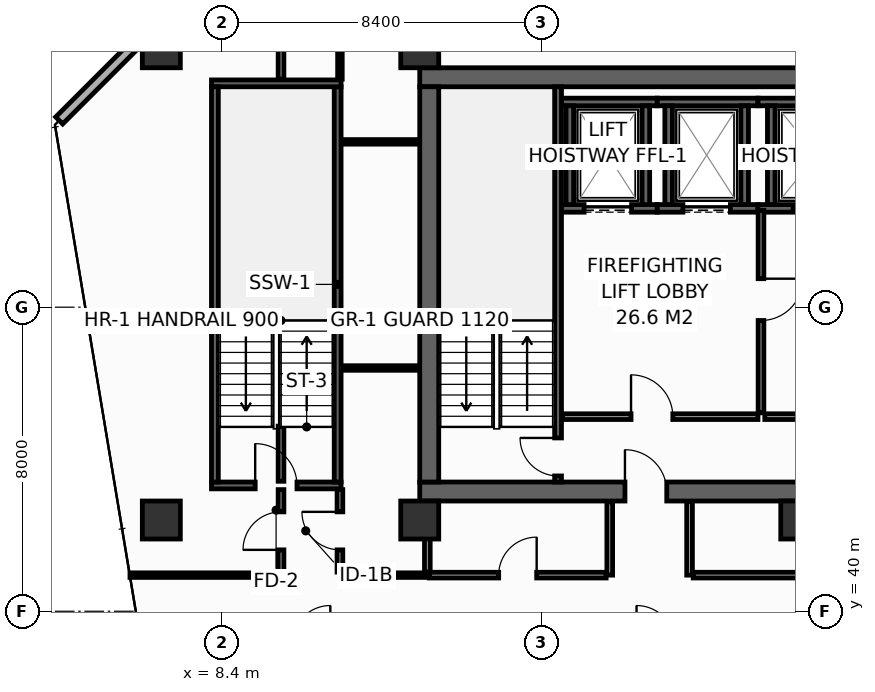
"""IFC4 building model, lengths in metres.
Left out: names, types, materials, properties, quantities, classifications, styles, units other than length and angle.
Written with IfcOpenShell. Run it as: python <this file> out.ifc"""

import sys

from ifc_helpers import new_model, si_unit, direction, frame, frame_2d, origin, origin_2d, place, context, subcontext, project, spatial, rectangle, hollow_rectangle, extrude, element, fill, save


model = new_model("IFC4")
c1 = context("Model", 3, precision=1e-05, world=origin(), true_north=direction((0.0, 1.0)))
c2 = subcontext(c1, "Body", "Model", "MODEL_VIEW")
j1 = project(units=[si_unit("LENGTHUNIT", "METRE"), si_unit("PLANEANGLEUNIT", "RADIAN")], contexts=[c1])
p1 = place(None, origin())
s1 = spatial("IfcSite", under=j1, at=p1, CompositionType="ELEMENT")
p2 = place(p1, origin())
s2 = spatial("IfcBuilding", under=s1, at=p2, CompositionType="ELEMENT")
p3 = place(p2, frame((0.0, 0.0, 148.6)))
s3 = spatial("IfcBuildingStorey", under=s2, at=p3, CompositionType="ELEMENT", Elevation=148.6)
p4 = place(p3, frame((13.6, 43.15, 0.0), z_axis=(0.0, 0.0, 1.0), x_axis=(1.0, 0.0, 0.0)))
e1 = element("IfcWall", 1, at=p4, inside=s3, PredefinedType="SHEAR", context=c2, shape_type="SweptSolid", body=[
    extrude(rectangle(XDim=32.7, YDim=0.5, at=frame_2d((16.35, 0.0))), origin(), (0.0, 0.0, 1.0), 3.55),
])
p5 = place(p4, frame((5.4, 0.0, 0.0)))
e2 = element("IfcOpeningElement", 2, at=p5, cuts=e1, PredefinedType="OPENING", context=c2, shape_type="SweptSolid", body=[
    extrude(rectangle(XDim=1.1, YDim=2.15, at=frame_2d((0.55, 1.075))), frame((0.0, 0.26, 0.0), z_axis=(0.0, -1.0, 0.0), x_axis=(1.0, 0.0, 0.0)), (0.0, 0.0, 1.0), 0.52),
])
p6 = place(p4, frame((25.6, 0.0, 0.0)))
e3 = element("IfcOpeningElement", 3, at=p6, cuts=e1, PredefinedType="OPENING", context=c2, shape_type="SweptSolid", body=[
    extrude(rectangle(XDim=1.1, YDim=2.15, at=frame_2d((0.55, 1.075))), frame((0.0, 0.26, 0.0), z_axis=(0.0, -1.0, 0.0), x_axis=(1.0, 0.0, 0.0)), (0.0, 0.0, 1.0), 0.52),
])
p7 = place(p3, frame((13.6, 54.05, 0.0), z_axis=(0.0, 0.0, 1.0), x_axis=(1.0, 0.0, 0.0)))
e4 = element("IfcWall", 4, at=p7, inside=s3, PredefinedType="SHEAR", context=c2, shape_type="SweptSolid", body=[
    extrude(rectangle(XDim=32.7, YDim=0.5, at=frame_2d((16.35, 0.0))), origin(), (0.0, 0.0, 1.0), 3.55),
])
p8 = place(p3, frame((13.85, 43.4, 0.0), z_axis=(0.0, 0.0, 1.0), x_axis=(0.0, 1.0, 0.0)))
e5 = element("IfcWall", 5, at=p8, inside=s3, PredefinedType="SHEAR", context=c2, shape_type="SweptSolid", body=[
    extrude(rectangle(XDim=10.4, YDim=0.5, at=frame_2d((5.2, 0.0))), origin(), (0.0, 0.0, 1.0), 3.55),
])
for number, where, z_axis, x_axis in (
    (6, (6.8, 54.8, 0.0), (0.0, 0.0, 1.0), (1.0, 0.0, 0.0)),
    (7, (13.6, 54.8, 0.0), (0.0, 0.0, 1.0), (1.0, 0.0, 0.0)),
    (8, (6.8, 42.4, 0.0), (0.0, 0.0, 1.0), (1.0, 0.0, 0.0)),
    (9, (13.6, 42.4, 0.0), (0.0, 0.0, 1.0), (1.0, 0.0, 0.0)),
    (10, (23.6, 42.4, 0.0), (0.0, 0.0, 1.0), (1.0, 0.0, 0.0)),
):
    element("IfcColumn", number, at=place(p3, frame(where, z_axis=z_axis, x_axis=x_axis)), inside=s3, PredefinedType="COLUMN", context=c2, shape_type="SweptSolid", body=[
        extrude(hollow_rectangle(XDim=1.0, YDim=1.0, WallThickness=0.045, at=origin_2d()), origin(), (0.0, 0.0, 1.0), 3.8),
    ])
p9 = place(p3, frame((17.33, 50.6, 0.0), z_axis=(0.0, 0.0, 1.0), x_axis=(1.0, 0.0, 0.0)))
e11 = element("IfcWall", 11, at=p9, inside=s3, PredefinedType="SHEAR", context=c2, shape_type="SweptSolid", body=[
    extrude(rectangle(XDim=2.52, YDim=0.2, at=frame_2d((1.26, 0.0))), origin(), (0.0, 0.0, 1.0), 3.55),
])
p10 = place(p9, frame((0.595, 0.0, 0.0)))
e12 = element("IfcOpeningElement", 12, at=p10, cuts=e11, PredefinedType="OPENING", context=c2, shape_type="SweptSolid", body=[
    extrude(rectangle(XDim=1.25, YDim=2.3, at=frame_2d((0.625, 1.15))), frame((0.0, 0.11, 0.0), z_axis=(0.0, -1.0, 0.0), x_axis=(1.0, 0.0, 0.0)), (0.0, 0.0, 1.0), 0.22),
])
p11 = place(p3, frame((17.33, 53.4, 0.0), z_axis=(0.0, 0.0, 1.0), x_axis=(1.0, 0.0, 0.0)))
e13 = element("IfcWall", 13, at=p11, inside=s3, PredefinedType="SHEAR", context=c2, shape_type="SweptSolid", body=[
    extrude(rectangle(XDim=2.52, YDim=0.2, at=frame_2d((1.26, 0.0))), origin(), (0.0, 0.0, 1.0), 3.55),
])
for number, where, z_axis, x_axis in (
    (14, (17.55, 50.7, 0.0), (0.0, 0.0, 1.0), (0.0, 1.0, 0.0)),
    (15, (19.55, 50.7, 0.0), (0.0, 0.0, 1.0), (0.0, 1.0, 0.0)),
):
    element("IfcWall", number, at=place(p3, frame(where, z_axis=z_axis, x_axis=x_axis)), inside=s3, PredefinedType="SHEAR", context=c2, shape_type="SweptSolid", body=[
        extrude(rectangle(XDim=2.6, YDim=0.2, at=frame_2d((1.3, 0.0))), origin(), (0.0, 0.0, 1.0), 3.55),
    ])
p12 = place(p3, frame((19.85, 50.6, 0.0), z_axis=(0.0, 0.0, 1.0), x_axis=(1.0, 0.0, 0.0)))
e16 = element("IfcWall", 16, at=p12, inside=s3, PredefinedType="SHEAR", context=c2, shape_type="SweptSolid", body=[
    extrude(rectangle(XDim=2.65, YDim=0.2, at=frame_2d((1.325, 0.0))), origin(), (0.0, 0.0, 1.0), 3.55),
])
p13 = place(p12, frame((0.675, 0.0, 0.0)))
e17 = element("IfcOpeningElement", 17, at=p13, cuts=e16, PredefinedType="OPENING", context=c2, shape_type="SweptSolid", body=[
    extrude(rectangle(XDim=1.25, YDim=2.3, at=frame_2d((0.625, 1.15))), frame((0.0, 0.11, 0.0), z_axis=(0.0, -1.0, 0.0), x_axis=(1.0, 0.0, 0.0)), (0.0, 0.0, 1.0), 0.22),
])
p14 = place(p3, frame((19.85, 53.4, 0.0), z_axis=(0.0, 0.0, 1.0), x_axis=(1.0, 0.0, 0.0)))
e18 = element("IfcWall", 18, at=p14, inside=s3, PredefinedType="SHEAR", context=c2, shape_type="SweptSolid", body=[
    extrude(rectangle(XDim=2.65, YDim=0.2, at=frame_2d((1.325, 0.0))), origin(), (0.0, 0.0, 1.0), 3.55),
])
for number, where, z_axis, x_axis in (
    (19, (20.15, 50.7, 0.0), (0.0, 0.0, 1.0), (0.0, 1.0, 0.0)),
    (20, (22.15, 50.7, 0.0), (0.0, 0.0, 1.0), (0.0, 1.0, 0.0)),
):
    element("IfcWall", number, at=place(p3, frame(where, z_axis=z_axis, x_axis=x_axis)), inside=s3, PredefinedType="SHEAR", context=c2, shape_type="SweptSolid", body=[
        extrude(rectangle(XDim=2.6, YDim=0.2, at=frame_2d((1.3, 0.0))), origin(), (0.0, 0.0, 1.0), 3.55),
    ])
p15 = place(p3, frame((22.5, 50.6, 0.0), z_axis=(0.0, 0.0, 1.0), x_axis=(1.0, 0.0, 0.0)))
e21 = element("IfcWall", 21, at=p15, inside=s3, PredefinedType="SHEAR", context=c2, shape_type="SweptSolid", body=[
    extrude(rectangle(XDim=2.85, YDim=0.2, at=frame_2d((1.425, 0.0))), origin(), (0.0, 0.0, 1.0), 3.55),
])
p16 = place(p15, frame((0.925, 0.0, 0.0)))
e22 = element("IfcOpeningElement", 22, at=p16, cuts=e21, PredefinedType="OPENING", context=c2, shape_type="SweptSolid", body=[
    extrude(rectangle(XDim=1.25, YDim=2.3, at=frame_2d((0.625, 1.15))), frame((0.0, 0.11, 0.0), z_axis=(0.0, -1.0, 0.0), x_axis=(1.0, 0.0, 0.0)), (0.0, 0.0, 1.0), 0.22),
])
p17 = place(p3, frame((22.5, 53.4, 0.0), z_axis=(0.0, 0.0, 1.0), x_axis=(1.0, 0.0, 0.0)))
e23 = element("IfcWall", 23, at=p17, inside=s3, PredefinedType="SHEAR", context=c2, shape_type="SweptSolid", body=[
    extrude(rectangle(XDim=2.85, YDim=0.2, at=frame_2d((1.425, 0.0))), origin(), (0.0, 0.0, 1.0), 3.55),
])
p18 = place(p3, frame((22.85, 50.7, 0.0), z_axis=(0.0, 0.0, 1.0), x_axis=(0.0, 1.0, 0.0)))
e24 = element("IfcWall", 24, at=p18, inside=s3, PredefinedType="SHEAR", context=c2, shape_type="SweptSolid", body=[
    extrude(rectangle(XDim=2.6, YDim=0.2, at=frame_2d((1.3, 0.0))), origin(), (0.0, 0.0, 1.0), 3.55),
])
p19 = place(p3, frame((17.24, 43.4, 0.0), z_axis=(0.0, 0.0, 1.0), x_axis=(0.0, 1.0, 0.0)))
e25 = element("IfcWall", 25, at=p19, inside=s3, PredefinedType="SHEAR", context=c2, shape_type="SweptSolid", body=[
    extrude(rectangle(XDim=10.4, YDim=0.18, at=frame_2d((5.2, 0.0))), origin(), (0.0, 0.0, 1.0), 3.55),
])
p20 = place(p19, frame((0.16, 0.0, 0.0)))
e26 = element("IfcOpeningElement", 26, at=p20, cuts=e25, PredefinedType="OPENING", context=c2, shape_type="SweptSolid", body=[
    extrude(rectangle(XDim=1.0, YDim=2.15, at=frame_2d((0.5, 1.075))), frame((0.0, 0.1, 0.0), z_axis=(0.0, -1.0, 0.0), x_axis=(1.0, 0.0, 0.0)), (0.0, 0.0, 1.0), 0.2),
])
p21 = place(p3, frame((8.12, 43.31, 0.0), z_axis=(0.0, 0.0, 1.0), x_axis=(1.0, 0.0, 0.0)))
e27 = element("IfcWall", 27, at=p21, inside=s3, PredefinedType="SHEAR", context=c2, shape_type="SweptSolid", body=[
    extrude(rectangle(XDim=3.41, YDim=0.18, at=frame_2d((1.705, 0.0))), origin(), (0.0, 0.0, 1.0), 3.55),
])
p22 = place(p21, frame((1.15, 0.0, 0.0)))
e28 = element("IfcOpeningElement", 28, at=p22, cuts=e27, PredefinedType="OPENING", context=c2, shape_type="SweptSolid", body=[
    extrude(rectangle(XDim=1.1, YDim=2.15, at=frame_2d((0.55, 1.075))), frame((0.0, 0.1, 0.0), z_axis=(0.0, -1.0, 0.0), x_axis=(1.0, 0.0, 0.0)), (0.0, 0.0, 1.0), 0.2),
])
p23 = place(p3, frame((11.44, 43.4, 0.0), z_axis=(0.0, 0.0, 1.0), x_axis=(0.0, 1.0, 0.0)))
e29 = element("IfcWall", 29, at=p23, inside=s3, PredefinedType="SHEAR", context=c2, shape_type="SweptSolid", body=[
    extrude(rectangle(XDim=10.4, YDim=0.18, at=frame_2d((5.2, 0.0))), origin(), (0.0, 0.0, 1.0), 3.55),
])
p24 = place(p3, frame((11.53, 53.89, 0.0), z_axis=(0.0, 0.0, 1.0), x_axis=(-1.0, 0.0, 0.0)))
e30 = element("IfcWall", 30, at=p24, inside=s3, PredefinedType="SHEAR", context=c2, shape_type="SweptSolid", body=[
    extrude(rectangle(XDim=3.41, YDim=0.18, at=frame_2d((1.705, 0.0))), origin(), (0.0, 0.0, 1.0), 3.55),
])
p25 = place(p3, frame((8.21, 53.8, 0.0), z_axis=(0.0, 0.0, 1.0), x_axis=(0.0, -1.0, 0.0)))
e31 = element("IfcWall", 31, at=p25, inside=s3, PredefinedType="SHEAR", context=c2, shape_type="SweptSolid", body=[
    extrude(rectangle(XDim=10.4, YDim=0.18, at=frame_2d((5.2, 0.0))), origin(), (0.0, 0.0, 1.0), 3.55),
])
p26 = place(p3, frame((17.36, 45.12, 0.0), z_axis=(0.0, 0.0, 1.0), x_axis=(1.0, 0.0, 0.0)))
e32 = element("IfcWall", 32, at=p26, inside=s3, PredefinedType="PARTITIONING", context=c2, shape_type="SweptSolid", body=[
    extrude(rectangle(XDim=5.14, YDim=0.15, at=frame_2d((2.57, 0.0))), origin(), (0.0, 0.0, 1.0), 3.55),
])
p27 = place(p26, frame((1.8, 0.0, 0.0)))
e33 = element("IfcOpeningElement", 33, at=p27, cuts=e32, PredefinedType="OPENING", context=c2, shape_type="SweptSolid", body=[
    extrude(rectangle(XDim=1.1, YDim=2.15, at=frame_2d((0.55, 1.075))), frame((0.0, 0.085, 0.0), z_axis=(0.0, -1.0, 0.0), x_axis=(1.0, 0.0, 0.0)), (0.0, 0.0, 1.0), 0.17),
])
p28 = place(p3, frame((22.58, 50.55, 0.0), z_axis=(0.0, 0.0, 1.0), x_axis=(0.0, -1.0, 0.0)))
e34 = element("IfcWall", 34, at=p28, inside=s3, PredefinedType="PARTITIONING", context=c2, shape_type="SweptSolid", body=[
    extrude(rectangle(XDim=5.33, YDim=0.15, at=frame_2d((2.665, 0.0))), origin(), (0.0, 0.0, 1.0), 3.55),
])
p29 = place(p28, frame((1.8, 0.0, 0.0)))
e35 = element("IfcOpeningElement", 35, at=p29, cuts=e34, PredefinedType="OPENING", context=c2, shape_type="SweptSolid", body=[
    extrude(rectangle(XDim=1.1, YDim=2.15, at=frame_2d((0.55, 1.075))), frame((0.0, 0.085, 0.0), z_axis=(0.0, -1.0, 0.0), x_axis=(1.0, 0.0, 0.0)), (0.0, 0.0, 1.0), 0.17),
])
p30 = place(p3, frame((22.68, 45.12, 0.0), z_axis=(0.0, 0.0, 1.0), x_axis=(1.0, 0.0, 0.0)))
e36 = element("IfcWall", 36, at=p30, inside=s3, PredefinedType="PARTITIONING", context=c2, shape_type="SweptSolid", body=[
    extrude(rectangle(XDim=2.92, YDim=0.15, at=frame_2d((1.46, 0.0))), origin(), (0.0, 0.0, 1.0), 3.55),
])
p31 = place(p30, frame((0.85, 0.0, 0.0)))
e37 = element("IfcOpeningElement", 37, at=p31, cuts=e36, PredefinedType="OPENING", context=c2, shape_type="SweptSolid", body=[
    extrude(rectangle(XDim=1.1, YDim=2.15, at=frame_2d((0.55, 1.075))), frame((0.0, 0.085, 0.0), z_axis=(0.0, -1.0, 0.0), x_axis=(1.0, 0.0, 0.0)), (0.0, 0.0, 1.0), 0.17),
])
p32 = place(p3, frame((7.087, 55.887, 0.0), z_axis=(0.0, 0.0, 1.0), x_axis=(-0.707106781187, -0.707106781187, 0.0)))
e38 = element("IfcWall", 38, at=p32, inside=s3, PredefinedType="STANDARD", context=c2, shape_type="SweptSolid", body=[
    extrude(rectangle(XDim=4.206, YDim=0.26, at=frame_2d((2.103, 0.0))), origin(), (0.0, 0.0, 1.0), 3.55),
])
p33 = place(p3, frame((5.975, 40.95, 0.0), z_axis=(0.0, 0.0, 1.0), x_axis=(1.0, 0.0, 0.0)))
e39 = element("IfcWall", 39, at=p33, inside=s3, PredefinedType="PARTITIONING", context=c2, shape_type="SweptSolid", body=[
    extrude(rectangle(XDim=3.975, YDim=0.12, at=frame_2d((1.987, 0.0))), origin(), (0.0, 0.0, 1.0), 3.035),
])
p34 = place(p3, frame((11.5, 40.95, 0.0), z_axis=(0.0, 0.0, 1.0), x_axis=(1.0, 0.0, 0.0)))
e40 = element("IfcWall", 40, at=p34, inside=s3, PredefinedType="PARTITIONING", context=c2, shape_type="SweptSolid", body=[
    extrude(rectangle(XDim=2.35, YDim=0.12, at=frame_2d((1.175, 0.0))), origin(), (0.0, 0.0, 1.0), 3.55),
])
p35 = place(p3, frame((11.55, 52.35, 0.0), z_axis=(0.0, 0.0, 1.0), x_axis=(1.0, 0.0, 0.0)))
e41 = element("IfcWall", 41, at=p35, inside=s3, PredefinedType="PARTITIONING", context=c2, shape_type="SweptSolid", body=[
    extrude(rectangle(XDim=2.03, YDim=0.12, at=frame_2d((1.015, 0.0))), origin(), (0.0, 0.0, 1.0), 3.55),
])
p36 = place(p3, frame((11.5, 54.0, 0.0), z_axis=(0.0, 0.0, 1.0), x_axis=(0.0, 1.0, 0.0)))
e42 = element("IfcWall", 42, at=p36, inside=s3, PredefinedType="PARTITIONING", context=c2, shape_type="SweptSolid", body=[
    extrude(rectangle(XDim=1.995, YDim=0.12, at=frame_2d((0.998, 0.0))), origin(), (0.0, 0.0, 1.0), 2.935),
])
p37 = place(p3, frame((4.87, 47.6, 0.0), z_axis=(0.0, 0.0, 1.0), x_axis=(1.0, 0.0, 0.0)))
e43 = element("IfcWall", 43, at=p37, inside=s3, PredefinedType="PARTITIONING", context=c2, shape_type="SweptSolid", body=[
    extrude(rectangle(XDim=3.23, YDim=0.12, at=frame_2d((1.615, 0.0))), origin(), (0.0, 0.0, 1.0), 2.835),
])
p38 = place(p3, frame((9.95, 41.03, 0.0), z_axis=(0.0, 0.0, 1.0), x_axis=(0.0, 1.0, 0.0)))
e44 = element("IfcWall", 44, at=p38, inside=s3, PredefinedType="PARTITIONING", context=c2, shape_type="SweptSolid", body=[
    extrude(rectangle(XDim=2.17, YDim=0.15, at=frame_2d((1.085, 0.0))), origin(), (0.0, 0.0, 1.0), 2.835),
])
p39 = place(p38, frame((0.585, 0.0, 0.0)))
e45 = element("IfcOpeningElement", 45, at=p39, cuts=e44, PredefinedType="OPENING", context=c2, shape_type="SweptSolid", body=[
    extrude(rectangle(XDim=1.0, YDim=2.15, at=frame_2d((0.5, 1.075))), frame((0.0, 0.085, 0.0), z_axis=(0.0, -1.0, 0.0), x_axis=(1.0, 0.0, 0.0)), (0.0, 0.0, 1.0), 0.17),
])
p40 = place(p3, frame((9.95, 43.42, 0.0), z_axis=(0.0, 0.0, 1.0), x_axis=(0.0, 1.0, 0.0)))
e46 = element("IfcWall", 46, at=p40, inside=s3, PredefinedType="PARTITIONING", context=c2, shape_type="SweptSolid", body=[
    extrude(rectangle(XDim=1.45, YDim=0.15, at=frame_2d((0.725, 0.0))), origin(), (0.0, 0.0, 1.0), 3.55),
])
p41 = place(p3, frame((9.95, 54.0, 0.0), z_axis=(0.0, 0.0, 1.0), x_axis=(0.0, 1.0, 0.0)))
e47 = element("IfcWall", 47, at=p41, inside=s3, PredefinedType="PARTITIONING", context=c2, shape_type="SweptSolid", body=[
    extrude(rectangle(XDim=1.995, YDim=0.15, at=frame_2d((0.998, 0.0))), origin(), (0.0, 0.0, 1.0), 2.935),
])
p42 = place(p3, frame((11.55, 46.4, 0.0), z_axis=(0.0, 0.0, 1.0), x_axis=(1.0, 0.0, 0.0)))
e48 = element("IfcWall", 48, at=p42, inside=s3, PredefinedType="PARTITIONING", context=c2, shape_type="SweptSolid", body=[
    extrude(rectangle(XDim=2.03, YDim=0.12, at=frame_2d((1.015, 0.0))), origin(), (0.0, 0.0, 1.0), 3.55),
])
p43 = place(p3, frame((11.5, 41.03, 0.0), z_axis=(0.0, 0.0, 1.0), x_axis=(0.0, 1.0, 0.0)))
e49 = element("IfcWall", 49, at=p43, inside=s3, PredefinedType="PARTITIONING", context=c2, shape_type="SweptSolid", body=[
    extrude(rectangle(XDim=2.17, YDim=0.15, at=frame_2d((1.085, 0.0))), origin(), (0.0, 0.0, 1.0), 2.835),
])
p44 = place(p43, frame((0.585, 0.0, 0.0)))
e50 = element("IfcOpeningElement", 50, at=p44, cuts=e49, PredefinedType="OPENING", context=c2, shape_type="SweptSolid", body=[
    extrude(rectangle(XDim=1.0, YDim=2.15, at=frame_2d((0.5, 1.075))), frame((0.0, 0.085, 0.0), z_axis=(0.0, -1.0, 0.0), x_axis=(1.0, 0.0, 0.0)), (0.0, 0.0, 1.0), 0.17),
])
p45 = place(p3, frame((13.8, 41.03, 0.0), z_axis=(0.0, 0.0, 1.0), x_axis=(0.0, 1.0, 0.0)))
e51 = element("IfcWall", 51, at=p45, inside=s3, PredefinedType="PARTITIONING", context=c2, shape_type="SweptSolid", body=[
    extrude(rectangle(XDim=1.85, YDim=0.15, at=frame_2d((0.925, 0.0))), origin(), (0.0, 0.0, 1.0), 3.55),
])
for number, where, z_axis, x_axis in (
    (52, (18.6, 40.95, 0.0), (0.0, 0.0, 1.0), (0.0, 1.0, 0.0)),
    (53, (20.7, 40.95, 0.0), (0.0, 0.0, 1.0), (0.0, 1.0, 0.0)),
):
    element("IfcWall", number, at=place(p3, frame(where, z_axis=z_axis, x_axis=x_axis)), inside=s3, PredefinedType="PARTITIONING", context=c2, shape_type="SweptSolid", body=[
        extrude(rectangle(XDim=1.93, YDim=0.15, at=frame_2d((0.965, 0.0))), origin(), (0.0, 0.0, 1.0), 3.55),
    ])
p46 = place(p3, frame((13.85, 40.95, 0.0), z_axis=(0.0, 0.0, 1.0), x_axis=(1.0, 0.0, 0.0)))
e54 = element("IfcWall", 54, at=p46, inside=s3, PredefinedType="PARTITIONING", context=c2, shape_type="SweptSolid", body=[
    extrude(rectangle(XDim=4.655, YDim=0.15, at=frame_2d((2.327, 0.0))), origin(), (0.0, 0.0, 1.0), 3.55),
])
p47 = place(p46, frame((1.827, 0.0, 0.0)))
e55 = element("IfcOpeningElement", 55, at=p47, cuts=e54, PredefinedType="OPENING", context=c2, shape_type="SweptSolid", body=[
    extrude(rectangle(XDim=1.0, YDim=2.15, at=frame_2d((0.5, 1.075))), frame((0.0, 0.085, 0.0), z_axis=(0.0, -1.0, 0.0), x_axis=(1.0, 0.0, 0.0)), (0.0, 0.0, 1.0), 0.17),
])
p48 = place(p3, frame((20.795, 40.95, 0.0), z_axis=(0.0, 0.0, 1.0), x_axis=(1.0, 0.0, 0.0)))
e56 = element("IfcWall", 56, at=p48, inside=s3, PredefinedType="PARTITIONING", context=c2, shape_type="SweptSolid", body=[
    extrude(rectangle(XDim=9.125, YDim=0.15, at=frame_2d((4.562, 0.0))), origin(), (0.0, 0.0, 1.0), 2.835),
])
p49 = place(p48, frame((4.062, 0.0, 0.0)))
e57 = element("IfcOpeningElement", 57, at=p49, cuts=e56, PredefinedType="OPENING", context=c2, shape_type="SweptSolid", body=[
    extrude(rectangle(XDim=1.0, YDim=2.15, at=frame_2d((0.5, 1.075))), frame((0.0, 0.085, 0.0), z_axis=(0.0, -1.0, 0.0), x_axis=(1.0, 0.0, 0.0)), (0.0, 0.0, 1.0), 0.17),
])
p50 = place(p10, origin())
e58 = element("IfcDoor", 58, at=p50, inside=s3, OperationType="SLIDING_TO_LEFT", PredefinedType="DOOR", context=c2, shape_type="SweptSolid", body=[
    extrude(rectangle(XDim=1.25, YDim=2.3, at=frame_2d((0.625, 1.15))), frame((0.0, 0.025, 0.0), z_axis=(0.0, -1.0, 0.0), x_axis=(1.0, 0.0, 0.0)), (0.0, 0.0, 1.0), 0.05),
])
fill(e12, e58)
p51 = place(p13, origin())
e59 = element("IfcDoor", 59, at=p51, inside=s3, OperationType="SLIDING_TO_LEFT", PredefinedType="DOOR", context=c2, shape_type="SweptSolid", body=[
    extrude(rectangle(XDim=1.25, YDim=2.3, at=frame_2d((0.625, 1.15))), frame((0.0, 0.025, 0.0), z_axis=(0.0, -1.0, 0.0), x_axis=(1.0, 0.0, 0.0)), (0.0, 0.0, 1.0), 0.05),
])
fill(e17, e59)
p52 = place(p16, origin())
e60 = element("IfcDoor", 60, at=p52, inside=s3, OperationType="SLIDING_TO_LEFT", PredefinedType="DOOR", context=c2, shape_type="SweptSolid", body=[
    extrude(rectangle(XDim=1.25, YDim=2.3, at=frame_2d((0.625, 1.15))), frame((0.0, 0.025, 0.0), z_axis=(0.0, -1.0, 0.0), x_axis=(1.0, 0.0, 0.0)), (0.0, 0.0, 1.0), 0.05),
])
fill(e22, e60)
p53 = place(p20, origin())
e61 = element("IfcDoor", 61, at=p53, inside=s3, OperationType="SINGLE_SWING_RIGHT", PredefinedType="DOOR", context=c2, shape_type="SweptSolid", body=[
    extrude(rectangle(XDim=1.0, YDim=2.15, at=frame_2d((0.5, 1.075))), frame((0.0, 0.025, 0.0), z_axis=(0.0, -1.0, 0.0), x_axis=(1.0, 0.0, 0.0)), (0.0, 0.0, 1.0), 0.05),
])
fill(e26, e61)
p54 = place(p22, origin())
e62 = element("IfcDoor", 62, at=p54, inside=s3, OperationType="SINGLE_SWING_LEFT", PredefinedType="DOOR", context=c2, shape_type="SweptSolid", body=[
    extrude(rectangle(XDim=1.1, YDim=2.15, at=frame_2d((0.55, 1.075))), frame((0.0, 0.025, 0.0), z_axis=(0.0, -1.0, 0.0), x_axis=(1.0, 0.0, 0.0)), (0.0, 0.0, 1.0), 0.05),
])
fill(e28, e62)
p55 = place(p27, origin())
e63 = element("IfcDoor", 63, at=p55, inside=s3, OperationType="SINGLE_SWING_LEFT", PredefinedType="DOOR", context=c2, shape_type="SweptSolid", body=[
    extrude(rectangle(XDim=1.1, YDim=2.15, at=frame_2d((0.55, 1.075))), frame((0.0, 0.025, 0.0), z_axis=(0.0, -1.0, 0.0), x_axis=(1.0, 0.0, 0.0)), (0.0, 0.0, 1.0), 0.05),
])
fill(e33, e63)
p56 = place(p29, origin())
e64 = element("IfcDoor", 64, at=p56, inside=s3, OperationType="SINGLE_SWING_LEFT", PredefinedType="DOOR", context=c2, shape_type="SweptSolid", body=[
    extrude(rectangle(XDim=1.1, YDim=2.15, at=frame_2d((0.55, 1.075))), frame((0.0, 0.025, 0.0), z_axis=(0.0, -1.0, 0.0), x_axis=(1.0, 0.0, 0.0)), (0.0, 0.0, 1.0), 0.05),
])
fill(e35, e64)
p57 = place(p5, origin())
e65 = element("IfcDoor", 65, at=p57, inside=s3, OperationType="SINGLE_SWING_LEFT", PredefinedType="DOOR", context=c2, shape_type="SweptSolid", body=[
    extrude(rectangle(XDim=1.1, YDim=2.15, at=frame_2d((0.55, 1.075))), frame((0.0, 0.025, 0.0), z_axis=(0.0, -1.0, 0.0), x_axis=(1.0, 0.0, 0.0)), (0.0, 0.0, 1.0), 0.05),
])
fill(e2, e65)
p58 = place(p39, origin())
e66 = element("IfcDoor", 66, at=p58, inside=s3, OperationType="SINGLE_SWING_LEFT", PredefinedType="DOOR", context=c2, shape_type="SweptSolid", body=[
    extrude(rectangle(XDim=1.0, YDim=2.15, at=frame_2d((0.5, 1.075))), frame((0.0, 0.025, 0.0), z_axis=(0.0, -1.0, 0.0), x_axis=(1.0, 0.0, 0.0)), (0.0, 0.0, 1.0), 0.05),
])
fill(e45, e66)
p59 = place(p44, origin())
e67 = element("IfcDoor", 67, at=p59, inside=s3, OperationType="SINGLE_SWING_RIGHT", PredefinedType="DOOR", context=c2, shape_type="SweptSolid", body=[
    extrude(rectangle(XDim=1.0, YDim=2.15, at=frame_2d((0.5, 1.075))), frame((0.0, 0.025, 0.0), z_axis=(0.0, -1.0, 0.0), x_axis=(1.0, 0.0, 0.0)), (0.0, 0.0, 1.0), 0.05),
])
fill(e50, e67)
p60 = place(p47, origin())
e68 = element("IfcDoor", 68, at=p60, inside=s3, OperationType="SINGLE_SWING_RIGHT", PredefinedType="DOOR", context=c2, shape_type="SweptSolid", body=[
    extrude(rectangle(XDim=1.0, YDim=2.15, at=frame_2d((0.5, 1.075))), frame((0.0, 0.025, 0.0), z_axis=(0.0, -1.0, 0.0), x_axis=(1.0, 0.0, 0.0)), (0.0, 0.0, 1.0), 0.05),
])
fill(e55, e68)
save(model, sys.argv[1])
